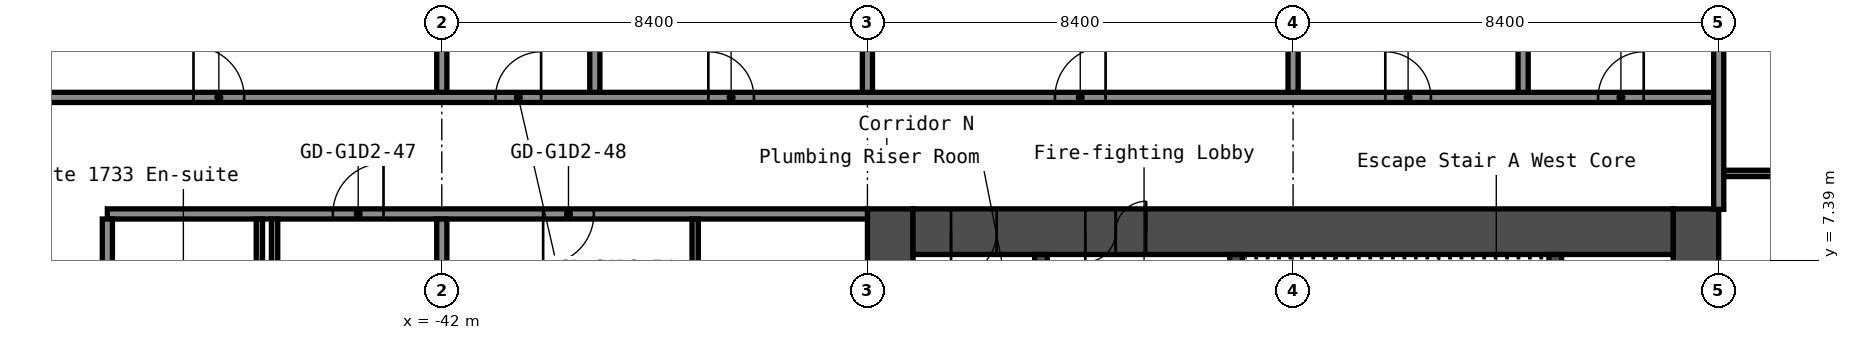
"""IFC4 building model, lengths in metres.
Left out: names, types, materials, properties, quantities, classifications, styles, units other than length and angle.
Written with IfcOpenShell. Run it as: python <this file> out.ifc"""

import sys

from ifc_helpers import new_model, si_unit, direction, frame, frame_2d, origin, place, context, subcontext, project, spatial, rectangle, extrude, element, fill, save


model = new_model("IFC4")
c1 = context("Model", 3, precision=1e-05, world=origin(), true_north=direction((0.0, 1.0)))
c2 = subcontext(c1, "Body", "Model", "MODEL_VIEW")
j1 = project(units=[si_unit("LENGTHUNIT", "METRE"), si_unit("PLANEANGLEUNIT", "RADIAN")], contexts=[c1])
p1 = place(None, origin())
s1 = spatial("IfcSite", under=j1, at=p1, CompositionType="ELEMENT")
p2 = place(p1, origin())
s2 = spatial("IfcBuilding", under=s1, at=p2, CompositionType="ELEMENT")
p3 = place(p2, frame((0.0, 0.0, 61.4)))
s3 = spatial("IfcBuildingStorey", under=s2, at=p3, CompositionType="ELEMENT", Elevation=61.4)
p4 = place(p3, frame((-17.25, -8.4, 0.0), z_axis=(0.0, 0.0, 1.0), x_axis=(0.0, 1.0, 0.0)))
e1 = element("IfcWall", 1, at=p4, inside=s3, PredefinedType="SHEAR", context=c2, shape_type="SweptSolid", body=[
    extrude(rectangle(XDim=16.8, YDim=0.9, at=frame_2d((8.4, 0.0))), origin(), (0.0, 0.0, 1.0), 2.9),
])
p5 = place(p4, frame((12.75, 0.0, 0.0)))
e2 = element("IfcOpeningElement", 2, at=p5, cuts=e1, PredefinedType="OPENING", context=c2, shape_type="SweptSolid", body=[
    extrude(rectangle(XDim=1.2, YDim=2.1, at=frame_2d((0.6, 1.05))), frame((0.0, 0.46, 0.0), z_axis=(0.0, -1.0, 0.0), x_axis=(1.0, 0.0, 0.0)), (0.0, 0.0, 1.0), 0.92),
])
p6 = place(p4, frame((2.85, 0.0, 0.0)))
e3 = element("IfcOpeningElement", 3, at=p6, cuts=e1, PredefinedType="OPENING", context=c2, shape_type="SweptSolid", body=[
    extrude(rectangle(XDim=1.2, YDim=2.1, at=frame_2d((0.6, 1.05))), frame((0.0, 0.46, 0.0), z_axis=(0.0, -1.0, 0.0), x_axis=(1.0, 0.0, 0.0)), (0.0, 0.0, 1.0), 0.92),
])
p7 = place(p3, frame((-33.15, -8.4, 0.0), z_axis=(0.0, 0.0, 1.0), x_axis=(0.0, 1.0, 0.0)))
e4 = element("IfcWall", 4, at=p7, inside=s3, PredefinedType="SHEAR", context=c2, shape_type="SweptSolid", body=[
    extrude(rectangle(XDim=16.8, YDim=0.9, at=frame_2d((8.4, 0.0))), origin(), (0.0, 0.0, 1.0), 2.9),
])
p8 = place(p3, frame((-32.7, 7.95, 0.0), z_axis=(0.0, 0.0, 1.0), x_axis=(1.0, 0.0, 0.0)))
e5 = element("IfcWall", 5, at=p8, inside=s3, PredefinedType="SHEAR", context=c2, shape_type="SweptSolid", body=[
    extrude(rectangle(XDim=15.0, YDim=0.9, at=frame_2d((7.5, 0.0))), origin(), (0.0, 0.0, 1.0), 2.9),
])
p9 = place(p8, frame((3.4, 0.0, 0.0)))
e6 = element("IfcOpeningElement", 6, at=p9, cuts=e5, PredefinedType="OPENING", context=c2, shape_type="SweptSolid", body=[
    extrude(rectangle(XDim=1.2, YDim=2.1, at=frame_2d((0.6, 1.05))), frame((0.0, 0.46, 0.0), z_axis=(0.0, -1.0, 0.0), x_axis=(1.0, 0.0, 0.0)), (0.0, 0.0, 1.0), 0.92),
])
p10 = place(p8, frame((0.75, 0.0, 0.0)))
e7 = element("IfcOpeningElement", 7, at=p10, cuts=e5, PredefinedType="OPENING", context=c2, shape_type="SweptSolid", body=[
    extrude(rectangle(XDim=0.9, YDim=2.1, at=frame_2d((0.45, 1.05))), frame((0.0, 0.46, 0.0), z_axis=(0.0, -1.0, 0.0), x_axis=(1.0, 0.0, 0.0)), (0.0, 0.0, 1.0), 0.92),
])
p11 = place(p3, frame((-20.025, 1.2, 0.0), z_axis=(0.0, 0.0, 1.0), x_axis=(0.0, 1.0, 0.0)))
e8 = element("IfcWall", 8, at=p11, inside=s3, PredefinedType="SHEAR", context=c2, shape_type="SweptSolid", body=[
    extrude(rectangle(XDim=6.3, YDim=0.25, at=frame_2d((3.15, 0.0))), origin(), (0.0, 0.0, 1.0), 2.9),
])
p12 = place(p3, frame((-26.325, 3.75, 0.0), z_axis=(0.0, 0.0, 1.0), x_axis=(0.0, 1.0, 0.0)))
e9 = element("IfcWall", 9, at=p12, inside=s3, PredefinedType="SHEAR", context=c2, shape_type="SweptSolid", body=[
    extrude(rectangle(XDim=3.75, YDim=0.25, at=frame_2d((1.875, 0.0))), origin(), (0.0, 0.0, 1.0), 2.9),
])
p13 = place(p12, frame((1.25, 0.0, 0.0)))
e10 = element("IfcOpeningElement", 10, at=p13, cuts=e9, PredefinedType="OPENING", context=c2, shape_type="SweptSolid", body=[
    extrude(rectangle(XDim=1.2, YDim=2.1, at=frame_2d((0.6, 1.05))), frame((0.0, 0.135, 0.0), z_axis=(0.0, -1.0, 0.0), x_axis=(1.0, 0.0, 0.0)), (0.0, 0.0, 1.0), 0.27),
])
p14 = place(p3, frame((-30.175, 1.45, 0.0), z_axis=(0.0, 0.0, 1.0), x_axis=(0.0, 1.0, 0.0)))
e11 = element("IfcWall", 11, at=p14, inside=s3, PredefinedType="SHEAR", context=c2, shape_type="SweptSolid", body=[
    extrude(rectangle(XDim=6.05, YDim=0.25, at=frame_2d((3.025, 0.0))), origin(), (0.0, 0.0, 1.0), 2.9),
])
p15 = place(p14, frame((2.625, 0.0, 0.0)))
e12 = element("IfcOpeningElement", 12, at=p15, cuts=e11, PredefinedType="OPENING", context=c2, shape_type="SweptSolid", body=[
    extrude(rectangle(XDim=1.1, YDim=2.1, at=frame_2d((0.55, 1.05))), frame((0.0, 0.135, 0.0), z_axis=(0.0, -1.0, 0.0), x_axis=(1.0, 0.0, 0.0)), (0.0, 0.0, 1.0), 0.27),
])
p16 = place(p3, frame((-48.6, 8.3, 0.0), z_axis=(0.0, 0.0, 1.0), x_axis=(1.0, 0.0, 0.0)))
e13 = element("IfcWall", 13, at=p16, inside=s3, PredefinedType="PARTITIONING", context=c2, shape_type="SweptSolid", body=[
    extrude(rectangle(XDim=15.0, YDim=0.2, at=frame_2d((7.5, 0.0))), origin(), (0.0, 0.0, 1.0), 2.9),
])
p17 = place(p16, frame((4.45, 0.0, 0.0)))
e14 = element("IfcOpeningElement", 14, at=p17, cuts=e13, PredefinedType="OPENING", context=c2, shape_type="SweptSolid", body=[
    extrude(rectangle(XDim=1.0, YDim=2.1, at=frame_2d((0.5, 1.05))), frame((0.0, 0.11, 0.0), z_axis=(0.0, -1.0, 0.0), x_axis=(1.0, 0.0, 0.0)), (0.0, 0.0, 1.0), 0.22),
])
p18 = place(p16, frame((8.6, 0.0, 0.0)))
e15 = element("IfcOpeningElement", 15, at=p18, cuts=e13, PredefinedType="OPENING", context=c2, shape_type="SweptSolid", body=[
    extrude(rectangle(XDim=1.0, YDim=2.1, at=frame_2d((0.5, 1.05))), frame((0.0, 0.11, 0.0), z_axis=(0.0, -1.0, 0.0), x_axis=(1.0, 0.0, 0.0)), (0.0, 0.0, 1.0), 0.22),
])
p19 = place(p3, frame((-16.7, 9.1, 0.0), z_axis=(0.0, 0.0, 1.0), x_axis=(1.0, 0.0, 0.0)))
e16 = element("IfcWall", 16, at=p19, inside=s3, PredefinedType="PARTITIONING", context=c2, shape_type="SweptSolid", body=[
    extrude(rectangle(XDim=2.337, YDim=0.125, at=frame_2d((1.169, 0.0))), origin(), (0.0, 0.0, 1.0), 2.9),
])
p20 = place(p3, frame((-51.1, 10.6, 0.0), z_axis=(0.0, 0.0, 1.0), x_axis=(1.0, 0.0, 0.0)))
e17 = element("IfcWall", 17, at=p20, inside=s3, PredefinedType="PARTITIONING", context=c2, shape_type="SweptSolid", body=[
    extrude(rectangle(XDim=34.3, YDim=0.2, at=frame_2d((17.15, 0.0))), origin(), (0.0, 0.0, 1.0), 2.9),
])
p21 = place(p20, frame((4.2, 0.0, 0.0)))
e18 = element("IfcOpeningElement", 18, at=p21, cuts=e17, PredefinedType="OPENING", context=c2, shape_type="SweptSolid", body=[
    extrude(rectangle(XDim=1.0, YDim=2.1, at=frame_2d((0.5, 1.05))), frame((0.0, 0.11, 0.0), z_axis=(0.0, -1.0, 0.0), x_axis=(1.0, 0.0, 0.0)), (0.0, 0.0, 1.0), 0.22),
])
p22 = place(p20, frame((10.16, 0.0, 0.0)))
e19 = element("IfcOpeningElement", 19, at=p22, cuts=e17, PredefinedType="OPENING", context=c2, shape_type="SweptSolid", body=[
    extrude(rectangle(XDim=0.9, YDim=2.1, at=frame_2d((0.45, 1.05))), frame((0.0, 0.11, 0.0), z_axis=(0.0, -1.0, 0.0), x_axis=(1.0, 0.0, 0.0)), (0.0, 0.0, 1.0), 0.22),
])
p23 = place(p20, frame((14.36, 0.0, 0.0)))
e20 = element("IfcOpeningElement", 20, at=p23, cuts=e17, PredefinedType="OPENING", context=c2, shape_type="SweptSolid", body=[
    extrude(rectangle(XDim=0.9, YDim=2.1, at=frame_2d((0.45, 1.05))), frame((0.0, 0.11, 0.0), z_axis=(0.0, -1.0, 0.0), x_axis=(1.0, 0.0, 0.0)), (0.0, 0.0, 1.0), 0.22),
])
p24 = place(p20, frame((21.2, 0.0, 0.0)))
e21 = element("IfcOpeningElement", 21, at=p24, cuts=e17, PredefinedType="OPENING", context=c2, shape_type="SweptSolid", body=[
    extrude(rectangle(XDim=1.0, YDim=2.1, at=frame_2d((0.5, 1.05))), frame((0.0, 0.11, 0.0), z_axis=(0.0, -1.0, 0.0), x_axis=(1.0, 0.0, 0.0)), (0.0, 0.0, 1.0), 0.22),
])
p25 = place(p20, frame((27.72, 0.0, 0.0)))
e22 = element("IfcOpeningElement", 22, at=p25, cuts=e17, PredefinedType="OPENING", context=c2, shape_type="SweptSolid", body=[
    extrude(rectangle(XDim=0.9, YDim=2.1, at=frame_2d((0.45, 1.05))), frame((0.0, 0.11, 0.0), z_axis=(0.0, -1.0, 0.0), x_axis=(1.0, 0.0, 0.0)), (0.0, 0.0, 1.0), 0.22),
])
p26 = place(p20, frame((31.92, 0.0, 0.0)))
e23 = element("IfcOpeningElement", 23, at=p26, cuts=e17, PredefinedType="OPENING", context=c2, shape_type="SweptSolid", body=[
    extrude(rectangle(XDim=0.9, YDim=2.1, at=frame_2d((0.45, 1.05))), frame((0.0, 0.11, 0.0), z_axis=(0.0, -1.0, 0.0), x_axis=(1.0, 0.0, 0.0)), (0.0, 0.0, 1.0), 0.22),
])
p27 = place(p3, frame((-48.6, -8.2, 0.0), z_axis=(0.0, 0.0, 1.0), x_axis=(0.0, 1.0, 0.0)))
e24 = element("IfcWall", 24, at=p27, inside=s3, PredefinedType="PARTITIONING", context=c2, shape_type="SweptSolid", body=[
    extrude(rectangle(XDim=16.4, YDim=0.2, at=frame_2d((8.2, 0.0))), origin(), (0.0, 0.0, 1.0), 2.9),
])
p28 = place(p3, frame((-45.6, 5.1, 0.0), z_axis=(0.0, 0.0, 1.0), x_axis=(0.0, 1.0, 0.0)))
e25 = element("IfcWall", 25, at=p28, inside=s3, PredefinedType="PARTITIONING", context=c2, shape_type="SweptSolid", body=[
    extrude(rectangle(XDim=3.1, YDim=0.125, at=frame_2d((1.55, 0.0))), origin(), (0.0, 0.0, 1.0), 2.9),
])
p29 = place(p3, frame((-45.3, 0.1, 0.0), z_axis=(0.0, 0.0, 1.0), x_axis=(0.0, 1.0, 0.0)))
e26 = element("IfcWall", 26, at=p29, inside=s3, PredefinedType="PARTITIONING", context=c2, shape_type="SweptSolid", body=[
    extrude(rectangle(XDim=8.1, YDim=0.125, at=frame_2d((4.05, 0.0))), origin(), (0.0, 0.0, 1.0), 2.9),
])
p30 = place(p29, frame((3.15, 0.0, 0.0)))
e27 = element("IfcOpeningElement", 27, at=p30, cuts=e26, PredefinedType="OPENING", context=c2, shape_type="SweptSolid", body=[
    extrude(rectangle(XDim=0.9, YDim=2.1, at=frame_2d((0.45, 1.05))), frame((0.0, 0.073, 0.0), z_axis=(0.0, -1.0, 0.0), x_axis=(1.0, 0.0, 0.0)), (0.0, 0.0, 1.0), 0.145),
])
p31 = place(p3, frame((-42.0, -8.2, 0.0), z_axis=(0.0, 0.0, 1.0), x_axis=(0.0, 1.0, 0.0)))
e28 = element("IfcWall", 28, at=p31, inside=s3, PredefinedType="PARTITIONING", context=c2, shape_type="SweptSolid", body=[
    extrude(rectangle(XDim=16.4, YDim=0.2, at=frame_2d((8.2, 0.0))), origin(), (0.0, 0.0, 1.0), 2.9),
])
for number, where, z_axis, x_axis in (
    (29, (-42.0, 10.7, 0.0), (0.0, 0.0, 1.0), (0.0, 1.0, 0.0)),
    (30, (-38.98, 10.7, 0.0), (0.0, 0.0, 1.0), (0.0, 1.0, 0.0)),
):
    element("IfcWall", number, at=place(p3, frame(where, z_axis=z_axis, x_axis=x_axis)), inside=s3, PredefinedType="PARTITIONING", context=c2, shape_type="SweptSolid", body=[
        extrude(rectangle(XDim=9.6, YDim=0.2, at=frame_2d((4.8, 0.0))), origin(), (0.0, 0.0, 1.0), 2.9),
    ])
p32 = place(p3, frame((-37.0, 4.9, 0.0), z_axis=(0.0, 0.0, 1.0), x_axis=(0.0, 1.0, 0.0)))
e31 = element("IfcWall", 31, at=p32, inside=s3, PredefinedType="PARTITIONING", context=c2, shape_type="SweptSolid", body=[
    extrude(rectangle(XDim=3.3, YDim=0.125, at=frame_2d((1.65, 0.0))), origin(), (0.0, 0.0, 1.0), 2.9),
])
for number, where, z_axis, x_axis in (
    (32, (-33.6, 10.7, 0.0), (0.0, 0.0, 1.0), (0.0, 1.0, 0.0)),
    (33, (-25.2, 10.7, 0.0), (0.0, 0.0, 1.0), (0.0, 1.0, 0.0)),
    (34, (-20.66, 10.7, 0.0), (0.0, 0.0, 1.0), (0.0, 1.0, 0.0)),
):
    element("IfcWall", number, at=place(p3, frame(where, z_axis=z_axis, x_axis=x_axis)), inside=s3, PredefinedType="PARTITIONING", context=c2, shape_type="SweptSolid", body=[
        extrude(rectangle(XDim=9.6, YDim=0.2, at=frame_2d((4.8, 0.0))), origin(), (0.0, 0.0, 1.0), 2.9),
    ])
p33 = place(p3, frame((-16.8, 8.39, 0.0), z_axis=(0.0, 0.0, 1.0), x_axis=(0.0, 1.0, 0.0)))
e35 = element("IfcWall", 35, at=p33, inside=s3, PredefinedType="PARTITIONING", context=c2, shape_type="SweptSolid", body=[
    extrude(rectangle(XDim=11.91, YDim=0.2, at=frame_2d((5.955, 0.0))), origin(), (0.0, 0.0, 1.0), 2.9),
])
p34 = place(p9, origin())
e36 = element("IfcDoor", 36, at=p34, inside=s3, OperationType="DOUBLE_DOOR_SINGLE_SWING", PredefinedType="DOOR", context=c2, shape_type="SweptSolid", body=[
    extrude(rectangle(XDim=1.2, YDim=2.1, at=frame_2d((0.6, 1.05))), frame((0.0, 0.025, 0.0), z_axis=(0.0, -1.0, 0.0), x_axis=(1.0, 0.0, 0.0)), (0.0, 0.0, 1.0), 0.05),
])
fill(e6, e36)
p35 = place(p10, origin())
e37 = element("IfcDoor", 37, at=p35, inside=s3, OperationType="SINGLE_SWING_LEFT", PredefinedType="DOOR", context=c2, shape_type="SweptSolid", body=[
    extrude(rectangle(XDim=0.9, YDim=2.1, at=frame_2d((0.45, 1.05))), frame((0.0, 0.025, 0.0), z_axis=(0.0, -1.0, 0.0), x_axis=(1.0, 0.0, 0.0)), (0.0, 0.0, 1.0), 0.05),
])
fill(e7, e37)
p36 = place(p17, origin())
e38 = element("IfcDoor", 38, at=p36, inside=s3, OperationType="SINGLE_SWING_LEFT", PredefinedType="DOOR", context=c2, shape_type="SweptSolid", body=[
    extrude(rectangle(XDim=1.0, YDim=2.1, at=frame_2d((0.5, 1.05))), frame((0.0, 0.025, 0.0), z_axis=(0.0, -1.0, 0.0), x_axis=(1.0, 0.0, 0.0)), (0.0, 0.0, 1.0), 0.05),
])
fill(e14, e38)
p37 = place(p18, origin())
e39 = element("IfcDoor", 39, at=p37, inside=s3, OperationType="SINGLE_SWING_LEFT", PredefinedType="DOOR", context=c2, shape_type="SweptSolid", body=[
    extrude(rectangle(XDim=1.0, YDim=2.1, at=frame_2d((0.5, 1.05))), frame((0.0, 0.025, 0.0), z_axis=(0.0, -1.0, 0.0), x_axis=(1.0, 0.0, 0.0)), (0.0, 0.0, 1.0), 0.05),
])
fill(e15, e39)
p38 = place(p21, origin())
e40 = element("IfcDoor", 40, at=p38, inside=s3, OperationType="SINGLE_SWING_RIGHT", PredefinedType="DOOR", context=c2, shape_type="SweptSolid", body=[
    extrude(rectangle(XDim=1.0, YDim=2.1, at=frame_2d((0.5, 1.05))), frame((0.0, 0.025, 0.0), z_axis=(0.0, -1.0, 0.0), x_axis=(1.0, 0.0, 0.0)), (0.0, 0.0, 1.0), 0.05),
])
fill(e18, e40)
p39 = place(p22, origin())
e41 = element("IfcDoor", 41, at=p39, inside=s3, OperationType="SINGLE_SWING_LEFT", PredefinedType="DOOR", context=c2, shape_type="SweptSolid", body=[
    extrude(rectangle(XDim=0.9, YDim=2.1, at=frame_2d((0.45, 1.05))), frame((0.0, 0.025, 0.0), z_axis=(0.0, -1.0, 0.0), x_axis=(1.0, 0.0, 0.0)), (0.0, 0.0, 1.0), 0.05),
])
fill(e19, e41)
p40 = place(p23, origin())
e42 = element("IfcDoor", 42, at=p40, inside=s3, OperationType="SINGLE_SWING_RIGHT", PredefinedType="DOOR", context=c2, shape_type="SweptSolid", body=[
    extrude(rectangle(XDim=0.9, YDim=2.1, at=frame_2d((0.45, 1.05))), frame((0.0, 0.025, 0.0), z_axis=(0.0, -1.0, 0.0), x_axis=(1.0, 0.0, 0.0)), (0.0, 0.0, 1.0), 0.05),
])
fill(e20, e42)
p41 = place(p24, origin())
e43 = element("IfcDoor", 43, at=p41, inside=s3, OperationType="SINGLE_SWING_LEFT", PredefinedType="DOOR", context=c2, shape_type="SweptSolid", body=[
    extrude(rectangle(XDim=1.0, YDim=2.1, at=frame_2d((0.5, 1.05))), frame((0.0, 0.025, 0.0), z_axis=(0.0, -1.0, 0.0), x_axis=(1.0, 0.0, 0.0)), (0.0, 0.0, 1.0), 0.05),
])
fill(e21, e43)
p42 = place(p25, origin())
e44 = element("IfcDoor", 44, at=p42, inside=s3, OperationType="SINGLE_SWING_RIGHT", PredefinedType="DOOR", context=c2, shape_type="SweptSolid", body=[
    extrude(rectangle(XDim=0.9, YDim=2.1, at=frame_2d((0.45, 1.05))), frame((0.0, 0.025, 0.0), z_axis=(0.0, -1.0, 0.0), x_axis=(1.0, 0.0, 0.0)), (0.0, 0.0, 1.0), 0.05),
])
fill(e22, e44)
p43 = place(p26, origin())
e45 = element("IfcDoor", 45, at=p43, inside=s3, OperationType="SINGLE_SWING_LEFT", PredefinedType="DOOR", context=c2, shape_type="SweptSolid", body=[
    extrude(rectangle(XDim=0.9, YDim=2.1, at=frame_2d((0.45, 1.05))), frame((0.0, 0.025, 0.0), z_axis=(0.0, -1.0, 0.0), x_axis=(1.0, 0.0, 0.0)), (0.0, 0.0, 1.0), 0.05),
])
fill(e23, e45)
save(model, sys.argv[1])
